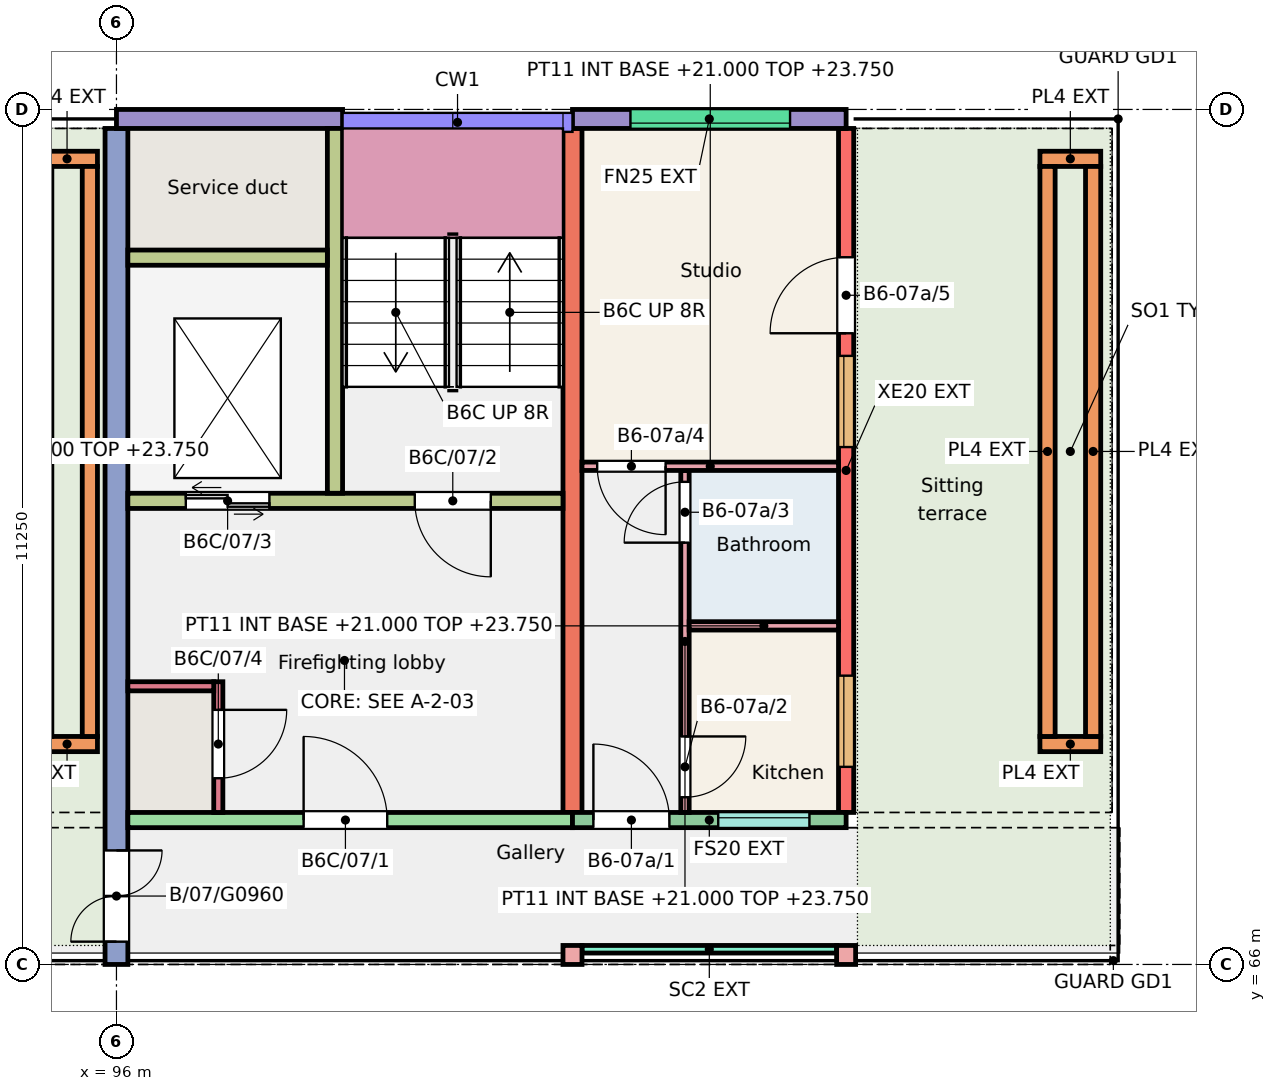
"""IFC4 building model, lengths in metres.
Left out: names, types, materials, properties, quantities, classifications, styles, units other than length and angle.
Written with IfcOpenShell. Run it as: python <this file> out.ifc"""

import sys

from ifc_helpers import new_model, si_unit, direction, frame, frame_2d, origin, origin_2d, place, context, subcontext, project, spatial, rectangle, extrude, element, fill, save


model = new_model("IFC4")
c1 = context("Model", 3, precision=1e-05, world=origin(), true_north=direction((0.0, 1.0)))
c2 = subcontext(c1, "Body", "Model", "MODEL_VIEW")
j1 = project(units=[si_unit("LENGTHUNIT", "METRE"), si_unit("PLANEANGLEUNIT", "RADIAN")], contexts=[c1])
p1 = place(None, origin())
s1 = spatial("IfcSite", under=j1, at=p1, CompositionType="ELEMENT")
p2 = place(p1, origin())
s2 = spatial("IfcBuilding", under=s1, at=p2, CompositionType="ELEMENT")
p3 = place(p2, frame((0.0, 0.0, 21.0)))
s3 = spatial("IfcBuildingStorey", under=s2, at=p3, CompositionType="ELEMENT", Elevation=21.0)
p4 = place(p3, frame((96.0, 66.0, 0.0), z_axis=(0.0, 0.0, 1.0), x_axis=(0.0, 1.0, 0.0)))
e1 = element("IfcWall", 1, at=p4, inside=s3, PredefinedType="SHEAR", context=c2, shape_type="SweptSolid", body=[
    extrude(rectangle(XDim=11.0, YDim=0.3, at=frame_2d((5.5, 0.0))), origin(), (0.0, 0.0, 1.0), 3.0),
])
p5 = place(p4, frame((0.3, 0.0, 0.0)))
e2 = element("IfcOpeningElement", 2, at=p5, cuts=e1, PredefinedType="OPENING", context=c2, shape_type="SweptSolid", body=[
    extrude(rectangle(XDim=1.2, YDim=2.1, at=frame_2d((0.6, 1.05))), frame((0.0, 0.16, 0.0), z_axis=(0.0, -1.0, 0.0), x_axis=(1.0, 0.0, 0.0)), (0.0, 0.0, 1.0), 0.32),
])
p6 = place(p3, frame((102.0, 68.0, 0.0), z_axis=(0.0, 0.0, 1.0), x_axis=(0.0, 1.0, 0.0)))
e3 = element("IfcWall", 3, at=p6, inside=s3, PredefinedType="SHEAR", context=c2, shape_type="SweptSolid", body=[
    extrude(rectangle(XDim=9.0, YDim=0.25, at=frame_2d((4.5, 0.0))), origin(), (0.0, 0.0, 1.0), 3.0),
])
p7 = place(p3, frame((105.6, 68.0, 0.0), z_axis=(0.0, 0.0, 1.0), x_axis=(0.0, 1.0, 0.0)))
e4 = element("IfcWall", 4, at=p7, inside=s3, PredefinedType="SHEAR", context=c2, shape_type="SweptSolid", body=[
    extrude(rectangle(XDim=9.0, YDim=0.2, at=frame_2d((4.5, 0.0))), origin(), (0.0, 0.0, 1.0), 3.0),
])
p8 = place(p7, frame((0.6, 0.0, 0.9)))
e5 = element("IfcOpeningElement", 5, at=p8, cuts=e4, PredefinedType="OPENING", context=c2, shape_type="SweptSolid", body=[
    extrude(rectangle(XDim=1.2, YDim=1.5, at=frame_2d((0.6, 0.75))), frame((0.0, 0.11, 0.0), z_axis=(0.0, -1.0, 0.0), x_axis=(1.0, 0.0, 0.0)), (0.0, 0.0, 1.0), 0.22),
])
p9 = place(p7, frame((4.808, 0.0, 0.9)))
e6 = element("IfcOpeningElement", 6, at=p9, cuts=e4, PredefinedType="OPENING", context=c2, shape_type="SweptSolid", body=[
    extrude(rectangle(XDim=1.2, YDim=1.5, at=frame_2d((0.6, 0.75))), frame((0.0, 0.11, 0.0), z_axis=(0.0, -1.0, 0.0), x_axis=(1.0, 0.0, 0.0)), (0.0, 0.0, 1.0), 0.22),
])
p10 = place(p7, frame((6.305, 0.0, 0.0)))
e7 = element("IfcOpeningElement", 7, at=p10, cuts=e4, PredefinedType="OPENING", context=c2, shape_type="SweptSolid", body=[
    extrude(rectangle(XDim=1.0, YDim=2.1, at=frame_2d((0.5, 1.05))), frame((0.0, 0.11, 0.0), z_axis=(0.0, -1.0, 0.0), x_axis=(1.0, 0.0, 0.0)), (0.0, 0.0, 1.0), 0.22),
])
p11 = place(p3, frame((96.0, 77.125, 0.0), z_axis=(0.0, 0.0, 1.0), x_axis=(1.0, 0.0, 0.0)))
e8 = element("IfcWall", 8, at=p11, inside=s3, PredefinedType="SOLIDWALL", context=c2, shape_type="SweptSolid", body=[
    extrude(rectangle(XDim=2.975, YDim=0.25, at=frame_2d((1.488, 0.0))), origin(), (0.0, 0.0, 1.0), 3.0),
])
p12 = place(p3, frame((96.15, 67.9, 0.0), z_axis=(0.0, 0.0, 1.0), x_axis=(1.0, 0.0, 0.0)))
e9 = element("IfcWall", 9, at=p12, inside=s3, PredefinedType="SHEAR", context=c2, shape_type="SweptSolid", body=[
    extrude(rectangle(XDim=5.85, YDim=0.2, at=frame_2d((2.925, 0.0))), origin(), (0.0, 0.0, 1.0), 3.0),
])
p13 = place(p12, frame((2.312, 0.0, 0.0)))
e10 = element("IfcOpeningElement", 10, at=p13, cuts=e9, PredefinedType="OPENING", context=c2, shape_type="SweptSolid", body=[
    extrude(rectangle(XDim=1.1, YDim=2.1, at=frame_2d((0.55, 1.05))), frame((0.0, 0.11, 0.0), z_axis=(0.0, -1.0, 0.0), x_axis=(1.0, 0.0, 0.0)), (0.0, 0.0, 1.0), 0.22),
])
p14 = place(p3, frame((96.15, 72.1, 0.0), z_axis=(0.0, 0.0, 1.0), x_axis=(1.0, 0.0, 0.0)))
e11 = element("IfcWall", 11, at=p14, inside=s3, PredefinedType="SHEAR", context=c2, shape_type="SweptSolid", body=[
    extrude(rectangle(XDim=5.725, YDim=0.2, at=frame_2d((2.863, 0.0))), origin(), (0.0, 0.0, 1.0), 3.0),
])
p15 = place(p14, frame((3.775, 0.0, 0.0)))
e12 = element("IfcOpeningElement", 12, at=p15, cuts=e11, PredefinedType="OPENING", context=c2, shape_type="SweptSolid", body=[
    extrude(rectangle(XDim=1.0, YDim=2.1, at=frame_2d((0.5, 1.05))), frame((0.0, 0.11, 0.0), z_axis=(0.0, -1.0, 0.0), x_axis=(1.0, 0.0, 0.0)), (0.0, 0.0, 1.0), 0.22),
])
p16 = place(p14, frame((0.762, 0.0, 0.0)))
e13 = element("IfcOpeningElement", 13, at=p16, cuts=e11, PredefinedType="OPENING", context=c2, shape_type="SweptSolid", body=[
    extrude(rectangle(XDim=1.1, YDim=2.1, at=frame_2d((0.55, 1.05))), frame((0.0, 0.11, 0.0), z_axis=(0.0, -1.0, 0.0), x_axis=(1.0, 0.0, 0.0)), (0.0, 0.0, 1.0), 0.22),
])
p17 = place(p3, frame((98.875, 72.2, 0.0), z_axis=(0.0, 0.0, 1.0), x_axis=(0.0, 1.0, 0.0)))
e14 = element("IfcWall", 14, at=p17, inside=s3, PredefinedType="SHEAR", context=c2, shape_type="SweptSolid", body=[
    extrude(rectangle(XDim=4.8, YDim=0.2, at=frame_2d((2.4, 0.0))), origin(), (0.0, 0.0, 1.0), 3.0),
])
p18 = place(p3, frame((96.15, 75.3, 0.0), z_axis=(0.0, 0.0, 1.0), x_axis=(1.0, 0.0, 0.0)))
e15 = element("IfcWall", 15, at=p18, inside=s3, PredefinedType="SHEAR", context=c2, shape_type="SweptSolid", body=[
    extrude(rectangle(XDim=2.625, YDim=0.2, at=frame_2d((1.312, 0.0))), origin(), (0.0, 0.0, 1.0), 3.0),
])
p19 = place(p3, frame((97.34, 68.0, 0.0), z_axis=(0.0, 0.0, 1.0), x_axis=(0.0, 1.0, 0.0)))
e16 = element("IfcWall", 16, at=p19, inside=s3, PredefinedType="SHEAR", context=c2, shape_type="SweptSolid", body=[
    extrude(rectangle(XDim=1.72, YDim=0.12, at=frame_2d((0.86, 0.0))), origin(), (0.0, 0.0, 1.0), 3.0),
])
p20 = place(p19, frame((0.45, 0.0, 0.0)))
e17 = element("IfcOpeningElement", 17, at=p20, cuts=e16, PredefinedType="OPENING", context=c2, shape_type="SweptSolid", body=[
    extrude(rectangle(XDim=0.9, YDim=2.1, at=frame_2d((0.45, 1.05))), frame((0.0, 0.07, 0.0), z_axis=(0.0, -1.0, 0.0), x_axis=(1.0, 0.0, 0.0)), (0.0, 0.0, 1.0), 0.14),
])
p21 = place(p3, frame((96.15, 69.66, 0.0), z_axis=(0.0, 0.0, 1.0), x_axis=(1.0, 0.0, 0.0)))
e18 = element("IfcWall", 18, at=p21, inside=s3, PredefinedType="SHEAR", context=c2, shape_type="SweptSolid", body=[
    extrude(rectangle(XDim=1.13, YDim=0.12, at=frame_2d((0.565, 0.0))), origin(), (0.0, 0.0, 1.0), 3.0),
])
p22 = place(p3, frame((102.0, 77.125, 0.0), z_axis=(0.0, 0.0, 1.0), x_axis=(1.0, 0.0, 0.0)))
e19 = element("IfcWall", 19, at=p22, inside=s3, PredefinedType="SOLIDWALL", context=c2, shape_type="SweptSolid", body=[
    extrude(rectangle(XDim=3.6, YDim=0.25, at=frame_2d((1.8, 0.0))), origin(), (0.0, 0.0, 1.0), 3.0),
])
p23 = place(p22, frame((0.762, 0.0, 1.2)))
e20 = element("IfcOpeningElement", 20, at=p23, cuts=e19, PredefinedType="OPENING", context=c2, shape_type="SweptSolid", body=[
    extrude(rectangle(XDim=2.1, YDim=1.2, at=frame_2d((1.05, 0.6))), frame((0.0, 0.135, 0.0), z_axis=(0.0, -1.0, 0.0), x_axis=(1.0, 0.0, 0.0)), (0.0, 0.0, 1.0), 0.27),
])
p24 = place(p3, frame((102.0, 67.9, 0.0), z_axis=(0.0, 0.0, 1.0), x_axis=(1.0, 0.0, 0.0)))
e21 = element("IfcWall", 21, at=p24, inside=s3, PredefinedType="SOLIDWALL", context=c2, shape_type="SweptSolid", body=[
    extrude(rectangle(XDim=3.6, YDim=0.2, at=frame_2d((1.8, 0.0))), origin(), (0.0, 0.0, 1.0), 3.0),
])
p25 = place(p24, frame((1.917, 0.0, 1.1)))
e22 = element("IfcOpeningElement", 22, at=p25, cuts=e21, PredefinedType="OPENING", context=c2, shape_type="SweptSolid", body=[
    extrude(rectangle(XDim=1.2, YDim=1.3, at=frame_2d((0.6, 0.65))), frame((0.0, 0.11, 0.0), z_axis=(0.0, -1.0, 0.0), x_axis=(1.0, 0.0, 0.0)), (0.0, 0.0, 1.0), 0.22),
])
p26 = place(p24, frame((0.275, 0.0, 0.0)))
e23 = element("IfcOpeningElement", 23, at=p26, cuts=e21, PredefinedType="OPENING", context=c2, shape_type="SweptSolid", body=[
    extrude(rectangle(XDim=1.0, YDim=2.1, at=frame_2d((0.5, 1.05))), frame((0.0, 0.11, 0.0), z_axis=(0.0, -1.0, 0.0), x_axis=(1.0, 0.0, 0.0)), (0.0, 0.0, 1.0), 0.22),
])
for number, where, z_axis, x_axis in (
    (24, (102.0, 66.125, 0.0), (0.0, 0.0, 1.0), (1.0, 0.0, 0.0)),
    (25, (105.6, 66.125, 0.0), (0.0, 0.0, 1.0), (1.0, 0.0, 0.0)),
):
    element("IfcColumn", number, at=place(p3, frame(where, z_axis=z_axis, x_axis=x_axis)), inside=s3, PredefinedType="COLUMN", context=c2, shape_type="SweptSolid", body=[
        extrude(rectangle(XDim=0.25, YDim=0.25, at=origin_2d()), origin(), (0.0, 0.0, 1.0), 3.0),
    ])
for number, where, z_axis, x_axis in (
    (26, (94.95, 68.9, 0.01), (0.0, 0.0, 1.0), (1.0, 0.0, 0.0)),
    (27, (94.95, 76.6, 0.01), (0.0, 0.0, 1.0), (1.0, 0.0, 0.0)),
):
    element("IfcWall", number, at=place(p3, frame(where, z_axis=z_axis, x_axis=x_axis)), inside=s3, PredefinedType="SOLIDWALL", context=c2, shape_type="SweptSolid", body=[
        extrude(rectangle(XDim=0.8, YDim=0.2, at=frame_2d((0.4, 0.0))), origin(), (0.0, 0.0, 1.0), 0.45),
    ])
for number, where, z_axis, x_axis in (
    (28, (95.05, 69.0, 0.01), (0.0, 0.0, 1.0), (0.0, 1.0, 0.0)),
    (29, (95.65, 69.0, 0.01), (0.0, 0.0, 1.0), (0.0, 1.0, 0.0)),
):
    element("IfcWall", number, at=place(p3, frame(where, z_axis=z_axis, x_axis=x_axis)), inside=s3, PredefinedType="SOLIDWALL", context=c2, shape_type="SweptSolid", body=[
        extrude(rectangle(XDim=7.5, YDim=0.2, at=frame_2d((3.75, 0.0))), origin(), (0.0, 0.0, 1.0), 0.45),
    ])
for number, where, z_axis, x_axis in (
    (30, (108.15, 68.9, 0.01), (0.0, 0.0, 1.0), (1.0, 0.0, 0.0)),
    (31, (108.15, 76.6, 0.01), (0.0, 0.0, 1.0), (1.0, 0.0, 0.0)),
):
    element("IfcWall", number, at=place(p3, frame(where, z_axis=z_axis, x_axis=x_axis)), inside=s3, PredefinedType="SOLIDWALL", context=c2, shape_type="SweptSolid", body=[
        extrude(rectangle(XDim=0.8, YDim=0.2, at=frame_2d((0.4, 0.0))), origin(), (0.0, 0.0, 1.0), 0.45),
    ])
for number, where, z_axis, x_axis in (
    (32, (108.25, 69.0, 0.01), (0.0, 0.0, 1.0), (0.0, 1.0, 0.0)),
    (33, (108.85, 69.0, 0.01), (0.0, 0.0, 1.0), (0.0, 1.0, 0.0)),
):
    element("IfcWall", number, at=place(p3, frame(where, z_axis=z_axis, x_axis=x_axis)), inside=s3, PredefinedType="SOLIDWALL", context=c2, shape_type="SweptSolid", body=[
        extrude(rectangle(XDim=7.5, YDim=0.2, at=frame_2d((3.75, 0.0))), origin(), (0.0, 0.0, 1.0), 0.45),
    ])
p27 = place(p3, frame((102.125, 66.2, 0.0), z_axis=(0.0, 0.0, 1.0), x_axis=(1.0, 0.0, 0.0)))
e34 = element("IfcWall", 34, at=p27, inside=s3, PredefinedType="SOLIDWALL", context=c2, shape_type="SweptSolid", body=[
    extrude(rectangle(XDim=3.35, YDim=0.1, at=frame_2d((1.675, 0.0))), origin(), (0.0, 0.0, 1.0), 2.45),
])
p28 = place(p3, frame((103.48, 68.0, 0.0), z_axis=(0.0, 0.0, 1.0), x_axis=(0.0, 1.0, 0.0)))
e35 = element("IfcWall", 35, at=p28, inside=s3, PredefinedType="PARTITIONING", context=c2, shape_type="SweptSolid", body=[
    extrude(rectangle(XDim=4.5, YDim=0.11, at=frame_2d((2.25, 0.0))), origin(), (0.0, 0.0, 1.0), 2.75),
])
p29 = place(p28, frame((0.2, 0.0, 0.0)))
e36 = element("IfcOpeningElement", 36, at=p29, cuts=e35, PredefinedType="OPENING", context=c2, shape_type="SweptSolid", body=[
    extrude(rectangle(XDim=0.8, YDim=2.1, at=frame_2d((0.4, 1.05))), frame((0.0, 0.065, 0.0), z_axis=(0.0, -1.0, 0.0), x_axis=(1.0, 0.0, 0.0)), (0.0, 0.0, 1.0), 0.13),
])
p30 = place(p28, frame((3.55, 0.0, 0.0)))
e37 = element("IfcOpeningElement", 37, at=p30, cuts=e35, PredefinedType="OPENING", context=c2, shape_type="SweptSolid", body=[
    extrude(rectangle(XDim=0.8, YDim=2.1, at=frame_2d((0.4, 1.05))), frame((0.0, 0.065, 0.0), z_axis=(0.0, -1.0, 0.0), x_axis=(1.0, 0.0, 0.0)), (0.0, 0.0, 1.0), 0.13),
])
p31 = place(p3, frame((103.535, 70.455, 0.0), z_axis=(0.0, 0.0, 1.0), x_axis=(1.0, 0.0, 0.0)))
e38 = element("IfcWall", 38, at=p31, inside=s3, PredefinedType="PARTITIONING", context=c2, shape_type="SweptSolid", body=[
    extrude(rectangle(XDim=1.965, YDim=0.11, at=frame_2d((0.982, 0.0))), origin(), (0.0, 0.0, 1.0), 2.75),
])
p32 = place(p3, frame((102.125, 72.555, 0.0), z_axis=(0.0, 0.0, 1.0), x_axis=(1.0, 0.0, 0.0)))
e39 = element("IfcWall", 39, at=p32, inside=s3, PredefinedType="PARTITIONING", context=c2, shape_type="SweptSolid", body=[
    extrude(rectangle(XDim=3.375, YDim=0.11, at=frame_2d((1.688, 0.0))), origin(), (0.0, 0.0, 1.0), 2.75),
])
p33 = place(p32, frame((0.2, 0.0, 0.0)))
e40 = element("IfcOpeningElement", 40, at=p33, cuts=e39, PredefinedType="OPENING", context=c2, shape_type="SweptSolid", body=[
    extrude(rectangle(XDim=0.9, YDim=2.1, at=frame_2d((0.45, 1.05))), frame((0.0, 0.065, 0.0), z_axis=(0.0, -1.0, 0.0), x_axis=(1.0, 0.0, 0.0)), (0.0, 0.0, 1.0), 0.13),
])
p34 = place(p25, origin())
e41 = element("IfcWindow", 41, at=p34, inside=s3, PartitioningType="SINGLE_PANEL", PredefinedType="WINDOW", context=c2, shape_type="SweptSolid", body=[
    extrude(rectangle(XDim=1.2, YDim=1.3, at=frame_2d((0.6, 0.65))), frame((0.0, 0.06, 0.0), z_axis=(0.0, -1.0, 0.0), x_axis=(1.0, 0.0, 0.0)), (0.0, 0.0, 1.0), 0.06),
])
fill(e22, e41)
p35 = place(p23, origin())
e42 = element("IfcWindow", 42, at=p35, inside=s3, PartitioningType="SINGLE_PANEL", PredefinedType="WINDOW", context=c2, shape_type="SweptSolid", body=[
    extrude(rectangle(XDim=2.1, YDim=1.2, at=frame_2d((1.05, 0.6))), frame((0.0, -0.025, 0.0), z_axis=(0.0, -1.0, 0.0), x_axis=(1.0, 0.0, 0.0)), (0.0, 0.0, 1.0), 0.06),
])
fill(e20, e42)
p36 = place(p8, origin())
e43 = element("IfcWindow", 43, at=p36, inside=s3, PartitioningType="SINGLE_PANEL", PredefinedType="WINDOW", context=c2, shape_type="SweptSolid", body=[
    extrude(rectangle(XDim=1.2, YDim=1.5, at=frame_2d((0.6, 0.75))), frame((0.0, 0.06, 0.0), z_axis=(0.0, -1.0, 0.0), x_axis=(1.0, 0.0, 0.0)), (0.0, 0.0, 1.0), 0.06),
])
fill(e5, e43)
p37 = place(p9, origin())
e44 = element("IfcWindow", 44, at=p37, inside=s3, PartitioningType="SINGLE_PANEL", PredefinedType="WINDOW", context=c2, shape_type="SweptSolid", body=[
    extrude(rectangle(XDim=1.2, YDim=1.5, at=frame_2d((0.6, 0.75))), frame((0.0, 0.06, 0.0), z_axis=(0.0, -1.0, 0.0), x_axis=(1.0, 0.0, 0.0)), (0.0, 0.0, 1.0), 0.06),
])
fill(e6, e44)
p38 = place(p26, origin())
e45 = element("IfcDoor", 45, at=p38, inside=s3, OperationType="SINGLE_SWING_LEFT", PredefinedType="DOOR", context=c2, shape_type="SweptSolid", body=[
    extrude(rectangle(XDim=1.0, YDim=2.1, at=frame_2d((0.5, 1.05))), frame((0.0, 0.025, 0.0), z_axis=(0.0, -1.0, 0.0), x_axis=(1.0, 0.0, 0.0)), (0.0, 0.0, 1.0), 0.05),
])
fill(e23, e45)
p39 = place(p29, origin())
e46 = element("IfcDoor", 46, at=p39, inside=s3, OperationType="SINGLE_SWING_RIGHT", PredefinedType="DOOR", context=c2, shape_type="SweptSolid", body=[
    extrude(rectangle(XDim=0.8, YDim=2.1, at=frame_2d((0.4, 1.05))), frame((0.0, 0.025, 0.0), z_axis=(0.0, -1.0, 0.0), x_axis=(1.0, 0.0, 0.0)), (0.0, 0.0, 1.0), 0.05),
])
fill(e36, e46)
p40 = place(p30, origin())
e47 = element("IfcDoor", 47, at=p40, inside=s3, OperationType="SINGLE_SWING_LEFT", PredefinedType="DOOR", context=c2, shape_type="SweptSolid", body=[
    extrude(rectangle(XDim=0.8, YDim=2.1, at=frame_2d((0.4, 1.05))), frame((0.0, 0.025, 0.0), z_axis=(0.0, -1.0, 0.0), x_axis=(1.0, 0.0, 0.0)), (0.0, 0.0, 1.0), 0.05),
])
fill(e37, e47)
p41 = place(p33, origin())
e48 = element("IfcDoor", 48, at=p41, inside=s3, OperationType="SINGLE_SWING_RIGHT", PredefinedType="DOOR", context=c2, shape_type="SweptSolid", body=[
    extrude(rectangle(XDim=0.9, YDim=2.1, at=frame_2d((0.45, 1.05))), frame((0.0, 0.025, 0.0), z_axis=(0.0, -1.0, 0.0), x_axis=(1.0, 0.0, 0.0)), (0.0, 0.0, 1.0), 0.05),
])
fill(e40, e48)
p42 = place(p10, origin())
e49 = element("IfcDoor", 49, at=p42, inside=s3, OperationType="SINGLE_SWING_LEFT", PredefinedType="DOOR", context=c2, shape_type="SweptSolid", body=[
    extrude(rectangle(XDim=1.0, YDim=2.1, at=frame_2d((0.5, 1.05))), frame((0.0, 0.025, 0.0), z_axis=(0.0, -1.0, 0.0), x_axis=(1.0, 0.0, 0.0)), (0.0, 0.0, 1.0), 0.05),
])
fill(e7, e49)
p43 = place(p13, origin())
e50 = element("IfcDoor", 50, at=p43, inside=s3, OperationType="SINGLE_SWING_LEFT", PredefinedType="DOOR", context=c2, shape_type="SweptSolid", body=[
    extrude(rectangle(XDim=1.1, YDim=2.1, at=frame_2d((0.55, 1.05))), frame((0.0, 0.025, 0.0), z_axis=(0.0, -1.0, 0.0), x_axis=(1.0, 0.0, 0.0)), (0.0, 0.0, 1.0), 0.05),
])
fill(e10, e50)
p44 = place(p15, origin())
e51 = element("IfcDoor", 51, at=p44, inside=s3, OperationType="SINGLE_SWING_RIGHT", PredefinedType="DOOR", context=c2, shape_type="SweptSolid", body=[
    extrude(rectangle(XDim=1.0, YDim=2.1, at=frame_2d((0.5, 1.05))), frame((0.0, 0.025, 0.0), z_axis=(0.0, -1.0, 0.0), x_axis=(1.0, 0.0, 0.0)), (0.0, 0.0, 1.0), 0.05),
])
fill(e12, e51)
p45 = place(p16, origin())
e52 = element("IfcDoor", 52, at=p45, inside=s3, OperationType="DOUBLE_DOOR_SLIDING", PredefinedType="DOOR", context=c2, shape_type="SweptSolid", body=[
    extrude(rectangle(XDim=1.1, YDim=2.1, at=frame_2d((0.55, 1.05))), frame((0.0, 0.025, 0.0), z_axis=(0.0, -1.0, 0.0), x_axis=(1.0, 0.0, 0.0)), (0.0, 0.0, 1.0), 0.05),
])
fill(e13, e52)
p46 = place(p20, origin())
e53 = element("IfcDoor", 53, at=p46, inside=s3, OperationType="SINGLE_SWING_RIGHT", PredefinedType="DOOR", context=c2, shape_type="SweptSolid", body=[
    extrude(rectangle(XDim=0.9, YDim=2.1, at=frame_2d((0.45, 1.05))), frame((0.0, 0.025, 0.0), z_axis=(0.0, -1.0, 0.0), x_axis=(1.0, 0.0, 0.0)), (0.0, 0.0, 1.0), 0.05),
])
fill(e17, e53)
p47 = place(p5, origin())
e54 = element("IfcDoor", 54, at=p47, inside=s3, OperationType="DOUBLE_DOOR_SINGLE_SWING", PredefinedType="DOOR", context=c2, shape_type="SweptSolid", body=[
    extrude(rectangle(XDim=1.2, YDim=2.1, at=frame_2d((0.6, 1.05))), frame((0.0, 0.025, 0.0), z_axis=(0.0, -1.0, 0.0), x_axis=(1.0, 0.0, 0.0)), (0.0, 0.0, 1.0), 0.05),
])
fill(e2, e54)
save(model, sys.argv[1])
